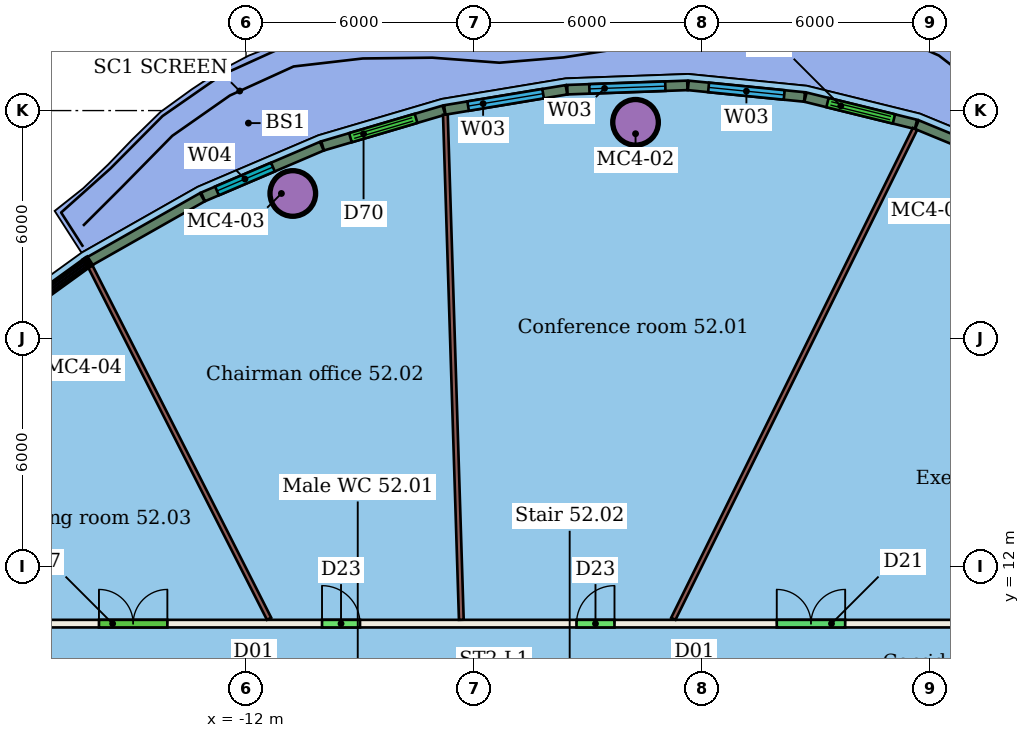
"""IFC4 building model, lengths in metres.
Left out: names, types, materials, properties, quantities, classifications, styles, units other than length and angle.
Written with IfcOpenShell. Run it as: python <this file> out.ifc"""

import sys

from ifc_helpers import new_model, si_unit, direction, frame, frame_2d, origin, origin_2d, place, context, subcontext, project, spatial, rectangle, hollow_circle, extrude, element, fill, save


model = new_model("IFC4")
c1 = context("Model", 3, precision=1e-05, world=origin(), true_north=direction((0.0, 1.0)))
c2 = subcontext(c1, "Body", "Model", "MODEL_VIEW")
j1 = project(units=[si_unit("LENGTHUNIT", "METRE"), si_unit("PLANEANGLEUNIT", "RADIAN")], contexts=[c1])
p1 = place(None, origin())
s1 = spatial("IfcSite", under=j1, at=p1, CompositionType="ELEMENT")
p2 = place(p1, origin())
s2 = spatial("IfcBuilding", under=s1, at=p2, CompositionType="ELEMENT")
p3 = place(p2, frame((0.0, 0.0, 213.7)))
s3 = spatial("IfcBuildingStorey", under=s2, at=p3, CompositionType="ELEMENT", Elevation=213.7)
for number, where, z_axis, x_axis in (
    (1, (-1.75, 23.691, 0.0), (0.0, 0.0, 1.0), (1.0, 0.0, 0.0)),
    (2, (-10.769, 21.819, 0.0), (0.0, 0.0, 1.0), (1.0, 0.0, 0.0)),
):
    element("IfcColumn", number, at=place(p3, frame(where, z_axis=z_axis, x_axis=x_axis)), inside=s3, PredefinedType="COLUMN", context=c2, shape_type="SweptSolid", body=[
        extrude(hollow_circle(Radius=0.6, WallThickness=0.045, at=origin_2d()), origin(), (0.0, 0.0, 1.0), 3.45),
    ])
p4 = place(p3, frame((-21.6, 10.5, 0.0), z_axis=(0.0, 0.0, 1.0), x_axis=(1.0, 0.0, 0.0)))
e3 = element("IfcWall", 3, at=p4, inside=s3, PredefinedType="PARTITIONING", context=c2, shape_type="SweptSolid", body=[
    extrude(rectangle(XDim=31.2, YDim=0.2, at=frame_2d((15.6, 0.0))), origin(), (0.0, 0.0, 1.0), 3.45),
])
p5 = place(p4, frame((18.296, 0.0, 0.0)))
e4 = element("IfcOpeningElement", 4, at=p5, cuts=e3, PredefinedType="OPENING", context=c2, shape_type="SweptSolid", body=[
    extrude(rectangle(XDim=1.0, YDim=2.4, at=frame_2d((0.5, 1.2))), frame((0.0, 0.11, 0.0), z_axis=(0.0, -1.0, 0.0), x_axis=(1.0, 0.0, 0.0)), (0.0, 0.0, 1.0), 0.22),
])
p6 = place(p4, frame((11.6, 0.0, 0.0)))
e5 = element("IfcOpeningElement", 5, at=p6, cuts=e3, PredefinedType="OPENING", context=c2, shape_type="SweptSolid", body=[
    extrude(rectangle(XDim=1.0, YDim=2.4, at=frame_2d((0.5, 1.2))), frame((0.0, 0.11, 0.0), z_axis=(0.0, -1.0, 0.0), x_axis=(1.0, 0.0, 0.0)), (0.0, 0.0, 1.0), 0.22),
])
p7 = place(p4, frame((5.73, 0.0, 0.0)))
e6 = element("IfcOpeningElement", 6, at=p7, cuts=e3, PredefinedType="OPENING", context=c2, shape_type="SweptSolid", body=[
    extrude(rectangle(XDim=1.8, YDim=2.4, at=frame_2d((0.9, 1.2))), frame((0.0, 0.11, 0.0), z_axis=(0.0, -1.0, 0.0), x_axis=(1.0, 0.0, 0.0)), (0.0, 0.0, 1.0), 0.22),
])
p8 = place(p4, frame((23.566, 0.0, 0.0)))
e7 = element("IfcOpeningElement", 7, at=p8, cuts=e3, PredefinedType="OPENING", context=c2, shape_type="SweptSolid", body=[
    extrude(rectangle(XDim=1.8, YDim=2.1, at=frame_2d((0.9, 1.05))), frame((0.0, 0.11, 0.0), z_axis=(0.0, -1.0, 0.0), x_axis=(1.0, 0.0, 0.0)), (0.0, 0.0, 1.0), 0.22),
])
p9 = place(p3, frame((5.603, 23.515, 0.0), z_axis=(0.0, 0.0, 1.0), x_axis=(-0.442477794817, -0.896779460678, 0.0)))
e8 = element("IfcWall", 8, at=p9, inside=s3, PredefinedType="PARTITIONING", context=c2, shape_type="SweptSolid", body=[
    extrude(rectangle(XDim=14.371, YDim=0.125, at=frame_2d((7.186, 0.0))), origin(), (0.0, 0.0, 1.0), 3.45),
])
p10 = place(p3, frame((-6.754, 23.892, 0.0), z_axis=(0.0, 0.0, 1.0), x_axis=(0.031543712499, -0.999502373285, 0.0)))
e9 = element("IfcWall", 9, at=p10, inside=s3, PredefinedType="PARTITIONING", context=c2, shape_type="SweptSolid", body=[
    extrude(rectangle(XDim=13.297, YDim=0.125, at=frame_2d((6.648, 0.0))), origin(), (0.0, 0.0, 1.0), 3.45),
])
p11 = place(p3, frame((-16.099, 19.903, 0.0), z_axis=(0.0, 0.0, 1.0), x_axis=(0.452483019346, -0.891773018881, 0.0)))
e10 = element("IfcWall", 10, at=p11, inside=s3, PredefinedType="PARTITIONING", context=c2, shape_type="SweptSolid", body=[
    extrude(rectangle(XDim=10.4, YDim=0.125, at=frame_2d((5.2, 0.0))), origin(), (0.0, 0.0, 1.0), 3.45),
])
p12 = place(p3, frame((8.323, 22.53, 0.0), z_axis=(0.0, 0.0, 1.0), x_axis=(-0.924690360412, 0.380720024901, 0.0)))
e11 = element("IfcWall", 11, at=p12, inside=s3, PredefinedType="SOLIDWALL", context=c2, shape_type="SweptSolid", body=[
    extrude(rectangle(XDim=2.886, YDim=0.25, at=frame_2d((1.443, 0.0))), origin(), (0.0, 0.0, 1.0), 3.1),
])
p13 = place(p3, frame((5.628, 23.637, 0.0), z_axis=(0.0, 0.0, 1.0), x_axis=(-0.9709618668, 0.239234306113, 0.0)))
e12 = element("IfcWall", 12, at=p13, inside=s3, PredefinedType="SOLIDWALL", context=c2, shape_type="SweptSolid", body=[
    extrude(rectangle(XDim=2.994, YDim=0.25, at=frame_2d((1.497, 0.0))), origin(), (0.0, 0.0, 1.0), 3.1),
])
p14 = place(p13, frame((0.597, 0.0, 0.0)))
e13 = element("IfcOpeningElement", 13, at=p14, cuts=e12, PredefinedType="OPENING", context=c2, shape_type="SweptSolid", body=[
    extrude(rectangle(XDim=1.8, YDim=2.4, at=frame_2d((0.9, 1.2))), frame((0.0, 0.135, 0.0), z_axis=(0.0, -1.0, 0.0), x_axis=(1.0, 0.0, 0.0)), (0.0, 0.0, 1.0), 0.27),
])
p15 = place(p3, frame((2.696, 24.358, 0.0), z_axis=(0.0, 0.0, 1.0), x_axis=(-0.995081139356, 0.099063242917, 0.0)))
e14 = element("IfcWall", 14, at=p15, inside=s3, PredefinedType="SOLIDWALL", context=c2, shape_type="SweptSolid", body=[
    extrude(rectangle(XDim=3.073, YDim=0.25, at=frame_2d((1.537, 0.0))), origin(), (0.0, 0.0, 1.0), 3.1),
])
p16 = place(p15, frame((0.537, 0.0, 0.9)))
e15 = element("IfcOpeningElement", 15, at=p16, cuts=e14, PredefinedType="OPENING", context=c2, shape_type="SweptSolid", body=[
    extrude(rectangle(XDim=2.0, YDim=2.1, at=frame_2d((1.0, 1.05))), frame((0.0, 0.135, 0.0), z_axis=(0.0, -1.0, 0.0), x_axis=(1.0, 0.0, 0.0)), (0.0, 0.0, 1.0), 0.27),
])
p17 = place(p3, frame((-0.387, 24.663, 0.0), z_axis=(0.0, 0.0, 1.0), x_axis=(-0.999351383862, -0.036011270096, 0.0)))
e16 = element("IfcWall", 16, at=p17, inside=s3, PredefinedType="SOLIDWALL", context=c2, shape_type="SweptSolid", body=[
    extrude(rectangle(XDim=3.159, YDim=0.25, at=frame_2d((1.58, 0.0))), origin(), (0.0, 0.0, 1.0), 3.1),
])
p18 = place(p17, frame((0.58, 0.0, 0.9)))
e17 = element("IfcOpeningElement", 17, at=p18, cuts=e16, PredefinedType="OPENING", context=c2, shape_type="SweptSolid", body=[
    extrude(rectangle(XDim=2.0, YDim=2.1, at=frame_2d((1.0, 1.05))), frame((0.0, 0.135, 0.0), z_axis=(0.0, -1.0, 0.0), x_axis=(1.0, 0.0, 0.0)), (0.0, 0.0, 1.0), 0.27),
])
p19 = place(p3, frame((-3.568, 24.547, 0.0), z_axis=(0.0, 0.0, 1.0), x_axis=(-0.986515622096, -0.163667123641, 0.0)))
e18 = element("IfcWall", 18, at=p19, inside=s3, PredefinedType="SOLIDWALL", context=c2, shape_type="SweptSolid", body=[
    extrude(rectangle(XDim=3.246, YDim=0.25, at=frame_2d((1.623, 0.0))), origin(), (0.0, 0.0, 1.0), 3.1),
])
p20 = place(p19, frame((0.623, 0.0, 0.9)))
e19 = element("IfcOpeningElement", 19, at=p20, cuts=e18, PredefinedType="OPENING", context=c2, shape_type="SweptSolid", body=[
    extrude(rectangle(XDim=2.0, YDim=2.1, at=frame_2d((1.0, 1.05))), frame((0.0, 0.135, 0.0), z_axis=(0.0, -1.0, 0.0), x_axis=(1.0, 0.0, 0.0)), (0.0, 0.0, 1.0), 0.27),
])
p21 = place(p3, frame((-6.793, 24.011, 0.0), z_axis=(0.0, 0.0, 1.0), x_axis=(-0.959226347216, -0.282639018548, 0.0)))
e20 = element("IfcWall", 20, at=p21, inside=s3, PredefinedType="SOLIDWALL", context=c2, shape_type="SweptSolid", body=[
    extrude(rectangle(XDim=3.327, YDim=0.25, at=frame_2d((1.664, 0.0))), origin(), (0.0, 0.0, 1.0), 3.1),
])
p22 = place(p21, frame((0.764, 0.0, 0.0)))
e21 = element("IfcOpeningElement", 21, at=p22, cuts=e20, PredefinedType="OPENING", context=c2, shape_type="SweptSolid", body=[
    extrude(rectangle(XDim=1.8, YDim=2.4, at=frame_2d((0.9, 1.2))), frame((0.0, 0.135, 0.0), z_axis=(0.0, -1.0, 0.0), x_axis=(1.0, 0.0, 0.0)), (0.0, 0.0, 1.0), 0.27),
])
p23 = place(p3, frame((-10.006, 23.063, 0.0), z_axis=(0.0, 0.0, 1.0), x_axis=(-0.919690332373, -0.392644486195, 0.0)))
e22 = element("IfcWall", 22, at=p23, inside=s3, PredefinedType="SOLIDWALL", context=c2, shape_type="SweptSolid", body=[
    extrude(rectangle(XDim=3.399, YDim=0.25, at=frame_2d((1.699, 0.0))), origin(), (0.0, 0.0, 1.0), 3.1),
])
p24 = place(p23, frame((1.399, 0.0, 0.9)))
e23 = element("IfcOpeningElement", 23, at=p24, cuts=e22, PredefinedType="OPENING", context=c2, shape_type="SweptSolid", body=[
    extrude(rectangle(XDim=1.6, YDim=2.1, at=frame_2d((0.8, 1.05))), frame((0.0, 0.135, 0.0), z_axis=(0.0, -1.0, 0.0), x_axis=(1.0, 0.0, 0.0)), (0.0, 0.0, 1.0), 0.27),
])
p25 = place(p3, frame((-13.152, 21.719, 0.0), z_axis=(0.0, 0.0, 1.0), x_axis=(-0.869705841478, -0.493570409666, 0.0)))
e24 = element("IfcWall", 24, at=p25, inside=s3, PredefinedType="SOLIDWALL", context=c2, shape_type="SweptSolid", body=[
    extrude(rectangle(XDim=3.412, YDim=0.25, at=frame_2d((1.706, 0.0))), origin(), (0.0, 0.0, 1.0), 3.1),
])
p26 = place(p5, origin())
e25 = element("IfcDoor", 25, at=p26, inside=s3, OperationType="SINGLE_SWING_RIGHT", PredefinedType="DOOR", context=c2, shape_type="SweptSolid", body=[
    extrude(rectangle(XDim=1.0, YDim=2.4, at=frame_2d((0.5, 1.2))), frame((0.0, 0.025, 0.0), z_axis=(0.0, -1.0, 0.0), x_axis=(1.0, 0.0, 0.0)), (0.0, 0.0, 1.0), 0.05),
])
fill(e4, e25)
p27 = place(p6, origin())
e26 = element("IfcDoor", 26, at=p27, inside=s3, OperationType="SINGLE_SWING_LEFT", PredefinedType="DOOR", context=c2, shape_type="SweptSolid", body=[
    extrude(rectangle(XDim=1.0, YDim=2.4, at=frame_2d((0.5, 1.2))), frame((0.0, 0.025, 0.0), z_axis=(0.0, -1.0, 0.0), x_axis=(1.0, 0.0, 0.0)), (0.0, 0.0, 1.0), 0.05),
])
fill(e5, e26)
p28 = place(p7, origin())
e27 = element("IfcDoor", 27, at=p28, inside=s3, OperationType="DOUBLE_DOOR_SINGLE_SWING", PredefinedType="DOOR", context=c2, shape_type="SweptSolid", body=[
    extrude(rectangle(XDim=1.8, YDim=2.4, at=frame_2d((0.9, 1.2))), frame((0.0, 0.025, 0.0), z_axis=(0.0, -1.0, 0.0), x_axis=(1.0, 0.0, 0.0)), (0.0, 0.0, 1.0), 0.05),
])
fill(e6, e27)
p29 = place(p8, origin())
e28 = element("IfcDoor", 28, at=p29, inside=s3, OperationType="DOUBLE_DOOR_SINGLE_SWING", PredefinedType="DOOR", context=c2, shape_type="SweptSolid", body=[
    extrude(rectangle(XDim=1.8, YDim=2.1, at=frame_2d((0.9, 1.05))), frame((0.0, 0.025, 0.0), z_axis=(0.0, -1.0, 0.0), x_axis=(1.0, 0.0, 0.0)), (0.0, 0.0, 1.0), 0.05),
])
fill(e7, e28)
p30 = place(p14, origin())
e29 = element("IfcDoor", 29, at=p30, inside=s3, OperationType="DOUBLE_DOOR_SLIDING", PredefinedType="DOOR", context=c2, shape_type="SweptSolid", body=[
    extrude(rectangle(XDim=1.8, YDim=2.4, at=frame_2d((0.9, 1.2))), frame((0.0, 0.025, 0.0), z_axis=(0.0, -1.0, 0.0), x_axis=(1.0, 0.0, 0.0)), (0.0, 0.0, 1.0), 0.05),
])
fill(e13, e29)
p31 = place(p16, origin())
e30 = element("IfcWindow", 30, at=p31, inside=s3, PartitioningType="SINGLE_PANEL", PredefinedType="WINDOW", context=c2, shape_type="SweptSolid", body=[
    extrude(rectangle(XDim=2.0, YDim=2.1, at=frame_2d((1.0, 1.05))), frame((0.0, 0.03, 0.0), z_axis=(0.0, -1.0, 0.0), x_axis=(1.0, 0.0, 0.0)), (0.0, 0.0, 1.0), 0.06),
])
fill(e15, e30)
p32 = place(p18, origin())
e31 = element("IfcWindow", 31, at=p32, inside=s3, PartitioningType="SINGLE_PANEL", PredefinedType="WINDOW", context=c2, shape_type="SweptSolid", body=[
    extrude(rectangle(XDim=2.0, YDim=2.1, at=frame_2d((1.0, 1.05))), frame((0.0, 0.03, 0.0), z_axis=(0.0, -1.0, 0.0), x_axis=(1.0, 0.0, 0.0)), (0.0, 0.0, 1.0), 0.06),
])
fill(e17, e31)
p33 = place(p20, origin())
e32 = element("IfcWindow", 32, at=p33, inside=s3, PartitioningType="SINGLE_PANEL", PredefinedType="WINDOW", context=c2, shape_type="SweptSolid", body=[
    extrude(rectangle(XDim=2.0, YDim=2.1, at=frame_2d((1.0, 1.05))), frame((0.0, 0.03, 0.0), z_axis=(0.0, -1.0, 0.0), x_axis=(1.0, 0.0, 0.0)), (0.0, 0.0, 1.0), 0.06),
])
fill(e19, e32)
p34 = place(p22, origin())
e33 = element("IfcDoor", 33, at=p34, inside=s3, OperationType="DOUBLE_DOOR_SLIDING", PredefinedType="DOOR", context=c2, shape_type="SweptSolid", body=[
    extrude(rectangle(XDim=1.8, YDim=2.4, at=frame_2d((0.9, 1.2))), frame((0.0, 0.025, 0.0), z_axis=(0.0, -1.0, 0.0), x_axis=(1.0, 0.0, 0.0)), (0.0, 0.0, 1.0), 0.05),
])
fill(e21, e33)
p35 = place(p24, origin())
e34 = element("IfcWindow", 34, at=p35, inside=s3, PartitioningType="SINGLE_PANEL", PredefinedType="WINDOW", context=c2, shape_type="SweptSolid", body=[
    extrude(rectangle(XDim=1.6, YDim=2.1, at=frame_2d((0.8, 1.05))), frame((0.0, 0.03, 0.0), z_axis=(0.0, -1.0, 0.0), x_axis=(1.0, 0.0, 0.0)), (0.0, 0.0, 1.0), 0.06),
])
fill(e23, e34)
save(model, sys.argv[1])
